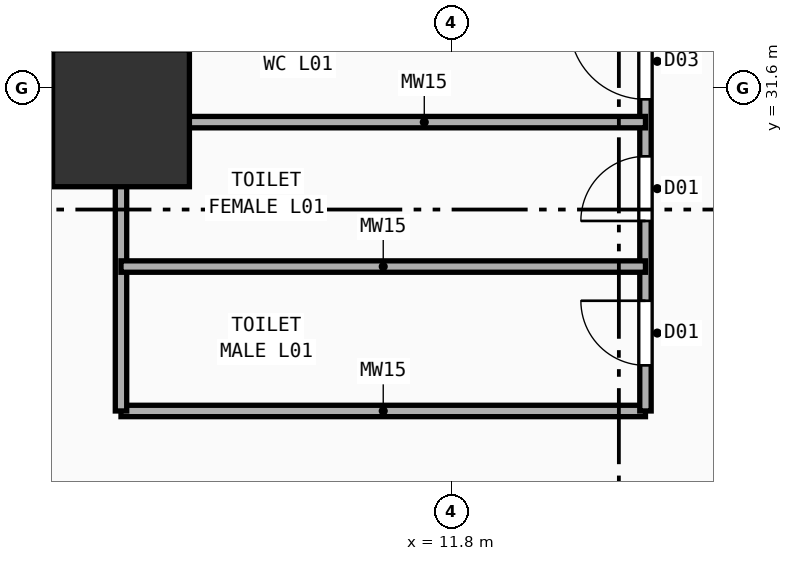
"""IFC4 building model, lengths in metres.
Left out: names, types, materials, properties, quantities, classifications, styles, units other than length and angle.
Written with IfcOpenShell. Run it as: python <this file> out.ifc"""

import sys

from ifc_helpers import new_model, si_unit, direction, frame, frame_2d, origin, origin_2d, place, context, subcontext, project, spatial, rectangle, extrude, element, fill, save


model = new_model("IFC4")
c1 = context("Model", 3, precision=1e-05, world=origin(), true_north=direction((0.0, 1.0)))
c2 = subcontext(c1, "Body", "Model", "MODEL_VIEW")
j1 = project(units=[si_unit("LENGTHUNIT", "METRE"), si_unit("PLANEANGLEUNIT", "RADIAN")], contexts=[c1])
p1 = place(None, origin())
s1 = spatial("IfcSite", under=j1, at=p1, CompositionType="ELEMENT")
p2 = place(p1, origin())
s2 = spatial("IfcBuilding", under=s1, at=p2, CompositionType="ELEMENT")
p3 = place(p2, origin())
s3 = spatial("IfcBuildingStorey", under=s2, at=p3, CompositionType="ELEMENT", Elevation=0.0)
p4 = place(p3, frame((7.45, 31.2, 0.0), z_axis=(0.0, 0.0, 1.0), x_axis=(1.0, 0.0, 0.0)))
e1 = element("IfcColumn", 1, at=p4, inside=s3, PredefinedType="COLUMN", context=c2, shape_type="SweptSolid", body=[
    extrude(rectangle(XDim=1.8, YDim=1.8, at=origin_2d()), origin(), (0.0, 0.0, 1.0), 5.26),
])
p5 = place(p3, frame((7.45, 27.35, 0.0), z_axis=(0.0, 0.0, 1.0), x_axis=(1.0, 0.0, 0.0)))
e2 = element("IfcWall", 2, at=p5, inside=s3, PredefinedType="PLUMBINGWALL", context=c2, shape_type="SweptSolid", body=[
    extrude(rectangle(XDim=6.9, YDim=0.15, at=frame_2d((3.45, 0.0))), origin(), (0.0, 0.0, 1.0), 5.26),
])
p6 = place(p3, frame((7.45, 27.35, 0.0), z_axis=(0.0, 0.0, 1.0), x_axis=(0.0, 1.0, 0.0)))
e3 = element("IfcWall", 3, at=p6, inside=s3, PredefinedType="PLUMBINGWALL", context=c2, shape_type="SweptSolid", body=[
    extrude(rectangle(XDim=5.65, YDim=0.15, at=frame_2d((2.825, 0.0))), origin(), (0.0, 0.0, 1.0), 4.9),
])
p7 = place(p3, frame((14.35, 27.35, 0.0), z_axis=(0.0, 0.0, 1.0), x_axis=(0.0, 1.0, 0.0)))
e4 = element("IfcWall", 4, at=p7, inside=s3, PredefinedType="PLUMBINGWALL", context=c2, shape_type="SweptSolid", body=[
    extrude(rectangle(XDim=5.65, YDim=0.15, at=frame_2d((2.825, 0.0))), origin(), (0.0, 0.0, 1.0), 5.26),
])
p8 = place(p7, frame((0.6, 0.0, 0.0)))
e5 = element("IfcOpeningElement", 5, at=p8, cuts=e4, PredefinedType="OPENING", context=c2, shape_type="SweptSolid", body=[
    extrude(rectangle(XDim=0.85, YDim=2.15, at=frame_2d((0.425, 1.075))), frame((0.0, 0.085, 0.0), z_axis=(0.0, -1.0, 0.0), x_axis=(1.0, 0.0, 0.0)), (0.0, 0.0, 1.0), 0.17),
])
p9 = place(p7, frame((2.5, 0.0, 0.0)))
e6 = element("IfcOpeningElement", 6, at=p9, cuts=e4, PredefinedType="OPENING", context=c2, shape_type="SweptSolid", body=[
    extrude(rectangle(XDim=0.85, YDim=2.15, at=frame_2d((0.425, 1.075))), frame((0.0, 0.085, 0.0), z_axis=(0.0, -1.0, 0.0), x_axis=(1.0, 0.0, 0.0)), (0.0, 0.0, 1.0), 0.17),
])
p10 = place(p7, frame((4.1, 0.0, 0.0)))
e7 = element("IfcOpeningElement", 7, at=p10, cuts=e4, PredefinedType="OPENING", context=c2, shape_type="SweptSolid", body=[
    extrude(rectangle(XDim=1.0, YDim=2.2, at=frame_2d((0.5, 1.1))), frame((0.0, 0.085, 0.0), z_axis=(0.0, -1.0, 0.0), x_axis=(1.0, 0.0, 0.0)), (0.0, 0.0, 1.0), 0.17),
])
p11 = place(p3, frame((7.45, 29.25, 0.0), z_axis=(0.0, 0.0, 1.0), x_axis=(1.0, 0.0, 0.0)))
e8 = element("IfcWall", 8, at=p11, inside=s3, PredefinedType="PLUMBINGWALL", context=c2, shape_type="SweptSolid", body=[
    extrude(rectangle(XDim=6.9, YDim=0.15, at=frame_2d((3.45, 0.0))), origin(), (0.0, 0.0, 1.0), 4.76),
])
p12 = place(p3, frame((7.45, 31.15, 0.0), z_axis=(0.0, 0.0, 1.0), x_axis=(1.0, 0.0, 0.0)))
e9 = element("IfcWall", 9, at=p12, inside=s3, PredefinedType="PLUMBINGWALL", context=c2, shape_type="SweptSolid", body=[
    extrude(rectangle(XDim=6.9, YDim=0.15, at=frame_2d((3.45, 0.0))), origin(), (0.0, 0.0, 1.0), 4.66),
])
p13 = place(p8, origin())
e10 = element("IfcDoor", 10, at=p13, inside=s3, OperationType="SINGLE_SWING_RIGHT", PredefinedType="DOOR", context=c2, shape_type="SweptSolid", body=[
    extrude(rectangle(XDim=0.85, YDim=2.15, at=frame_2d((0.425, 1.075))), frame((0.0, 0.025, 0.0), z_axis=(0.0, -1.0, 0.0), x_axis=(1.0, 0.0, 0.0)), (0.0, 0.0, 1.0), 0.05),
])
fill(e5, e10)
p14 = place(p9, origin())
e11 = element("IfcDoor", 11, at=p14, inside=s3, OperationType="SINGLE_SWING_LEFT", PredefinedType="DOOR", context=c2, shape_type="SweptSolid", body=[
    extrude(rectangle(XDim=0.85, YDim=2.15, at=frame_2d((0.425, 1.075))), frame((0.0, 0.025, 0.0), z_axis=(0.0, -1.0, 0.0), x_axis=(1.0, 0.0, 0.0)), (0.0, 0.0, 1.0), 0.05),
])
fill(e6, e11)
p15 = place(p10, origin())
e12 = element("IfcDoor", 12, at=p15, inside=s3, OperationType="SINGLE_SWING_RIGHT", PredefinedType="DOOR", context=c2, shape_type="SweptSolid", body=[
    extrude(rectangle(XDim=1.0, YDim=2.2, at=frame_2d((0.5, 1.1))), frame((0.0, 0.025, 0.0), z_axis=(0.0, -1.0, 0.0), x_axis=(1.0, 0.0, 0.0)), (0.0, 0.0, 1.0), 0.05),
])
fill(e7, e12)
save(model, sys.argv[1])
